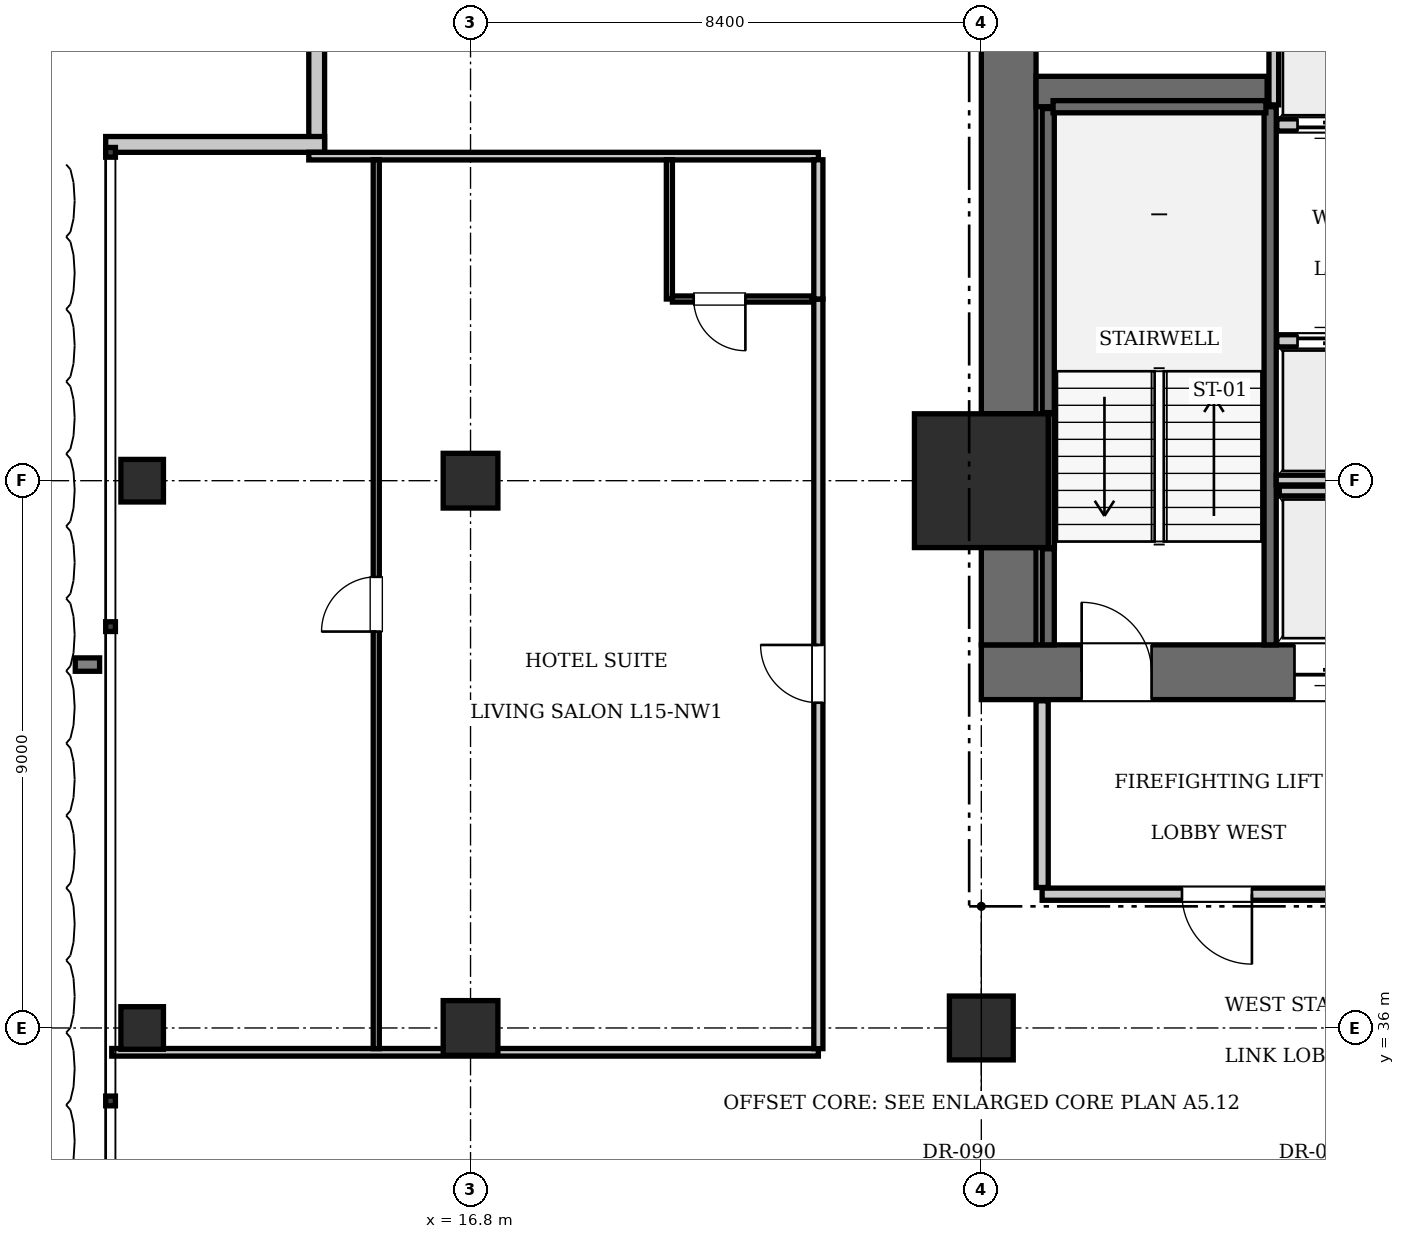
"""IFC4 building model, lengths in metres.
Left out: names, types, materials, properties, quantities, classifications, styles, units other than length and angle.
Written with IfcOpenShell. Run it as: python <this file> out.ifc"""

import sys

from ifc_helpers import new_model, si_unit, direction, frame, frame_2d, origin, origin_2d, place, context, subcontext, project, spatial, rectangle, i_section, extrude, element, fill, save


model = new_model("IFC4")
c1 = context("Model", 3, precision=1e-05, world=origin(), true_north=direction((0.0, 1.0)))
c2 = subcontext(c1, "Body", "Model", "MODEL_VIEW")
j1 = project(units=[si_unit("LENGTHUNIT", "METRE"), si_unit("PLANEANGLEUNIT", "RADIAN")], contexts=[c1])
p1 = place(None, origin())
s1 = spatial("IfcSite", under=j1, at=p1, CompositionType="ELEMENT")
p2 = place(p1, origin())
s2 = spatial("IfcBuilding", under=s1, at=p2, CompositionType="ELEMENT")
p3 = place(p2, frame((0.0, 0.0, 65.45)))
s3 = spatial("IfcBuildingStorey", under=s2, at=p3, CompositionType="ELEMENT", Elevation=65.45)
p4 = place(p3, frame((25.2, 45.0, 0.0), z_axis=(0.0, 0.0, 1.0), x_axis=(1.0, 0.0, 0.0)))
e1 = element("IfcColumn", 1, at=p4, inside=s3, PredefinedType="COLUMN", context=c2, shape_type="SweptSolid", body=[
    extrude(rectangle(XDim=2.2, YDim=2.2, at=origin_2d()), origin(), (0.0, 0.0, 1.0), 3.85),
])
p5 = place(p3, frame((25.2, 41.85, 0.0), z_axis=(0.0, 0.0, 1.0), x_axis=(1.0, 0.0, 0.0)))
e2 = element("IfcWall", 2, at=p5, inside=s3, PredefinedType="SHEAR", context=c2, shape_type="SweptSolid", body=[
    extrude(rectangle(XDim=6.8, YDim=0.9, at=frame_2d((3.4, 0.0))), origin(), (0.0, 0.0, 1.0), 3.85),
])
p6 = place(p5, frame((1.65, 0.0, 0.0)))
e3 = element("IfcOpeningElement", 3, at=p6, cuts=e2, PredefinedType="OPENING", context=c2, shape_type="SweptSolid", body=[
    extrude(rectangle(XDim=1.15, YDim=2.15, at=frame_2d((0.575, 1.075))), frame((0.0, 0.46, 0.0), z_axis=(0.0, -1.0, 0.0), x_axis=(1.0, 0.0, 0.0)), (0.0, 0.0, 1.0), 0.92),
])
p7 = place(p5, frame((5.15, 0.0, 0.0)))
e4 = element("IfcOpeningElement", 4, at=p7, cuts=e2, PredefinedType="OPENING", context=c2, shape_type="SweptSolid", body=[
    extrude(rectangle(XDim=1.1, YDim=2.2, at=frame_2d((0.55, 1.1))), frame((0.0, 0.46, 0.0), z_axis=(0.0, -1.0, 0.0), x_axis=(1.0, 0.0, 0.0)), (0.0, 0.0, 1.0), 0.92),
])
p8 = place(p3, frame((25.65, 42.3, 0.0), z_axis=(0.0, 0.0, 1.0), x_axis=(0.0, 1.0, 0.0)))
e5 = element("IfcWall", 5, at=p8, inside=s3, PredefinedType="SHEAR", context=c2, shape_type="SweptSolid", body=[
    extrude(rectangle(XDim=1.6, YDim=0.9, at=frame_2d((0.8, 0.0))), origin(), (0.0, 0.0, 1.0), 3.85),
])
p9 = place(p3, frame((25.65, 46.1, 0.0), z_axis=(0.0, 0.0, 1.0), x_axis=(0.0, 1.0, 0.0)))
e6 = element("IfcWall", 6, at=p9, inside=s3, PredefinedType="SHEAR", context=c2, shape_type="SweptSolid", body=[
    extrude(rectangle(XDim=7.0, YDim=0.9, at=frame_2d((3.5, 0.0))), origin(), (0.0, 0.0, 1.0), 3.85),
])
p10 = place(p3, frame((26.1, 51.4, 0.0), z_axis=(0.0, 0.0, 1.0), x_axis=(1.0, 0.0, 0.0)))
e7 = element("IfcWall", 7, at=p10, inside=s3, PredefinedType="SHEAR", context=c2, shape_type="SweptSolid", body=[
    extrude(rectangle(XDim=3.8, YDim=0.5, at=frame_2d((1.9, 0.0))), origin(), (0.0, 0.0, 1.0), 3.85),
])
p11 = place(p3, frame((25.2, 36.0, 0.0), z_axis=(0.0, 0.0, 1.0), x_axis=(1.0, 0.0, 0.0)))
e8 = element("IfcColumn", 8, at=p11, inside=s3, PredefinedType="COLUMN", context=c2, shape_type="SweptSolid", body=[
    extrude(rectangle(XDim=1.05, YDim=1.05, at=origin_2d()), origin(), (0.0, 0.0, 1.0), 3.85),
])
for number, where, z_axis, x_axis in (
    (9, (16.8, 36.0, 0.0), (0.0, 0.0, 1.0), (1.0, 0.0, 0.0)),
    (10, (16.8, 45.0, 0.0), (0.0, 0.0, 1.0), (1.0, 0.0, 0.0)),
):
    element("IfcColumn", number, at=place(p3, frame(where, z_axis=z_axis, x_axis=x_axis)), inside=s3, PredefinedType="COLUMN", context=c2, shape_type="SweptSolid", body=[
        extrude(rectangle(XDim=0.9, YDim=0.9, at=origin_2d()), origin(), (0.0, 0.0, 1.0), 3.85),
    ])
for number, where, z_axis, x_axis in (
    (11, (11.4, 36.0, 0.0), (0.0, 0.0, 1.0), (1.0, 0.0, 0.0)),
    (12, (11.4, 45.0, 0.0), (0.0, 0.0, 1.0), (1.0, 0.0, 0.0)),
):
    element("IfcColumn", number, at=place(p3, frame(where, z_axis=z_axis, x_axis=x_axis)), inside=s3, PredefinedType="COLUMN", context=c2, shape_type="SweptSolid", body=[
        extrude(i_section(OverallWidth=0.7, OverallDepth=0.7, WebThickness=0.028, FlangeThickness=0.044, at=origin_2d()), origin(), (0.0, 0.0, 1.0), 3.85),
    ])
p12 = place(p3, frame((29.95, 42.3, 0.0), z_axis=(0.0, 0.0, 1.0), x_axis=(0.0, 1.0, 0.0)))
e13 = element("IfcWall", 13, at=p12, inside=s3, PredefinedType="SOLIDWALL", context=c2, shape_type="SweptSolid", body=[
    extrude(rectangle(XDim=8.85, YDim=0.2, at=frame_2d((4.425, 0.0))), origin(), (0.0, 0.0, 1.0), 3.61),
])
p13 = place(p3, frame((26.3, 42.3, 0.0), z_axis=(0.0, 0.0, 1.0), x_axis=(0.0, 1.0, 0.0)))
e14 = element("IfcWall", 14, at=p13, inside=s3, PredefinedType="SOLIDWALL", context=c2, shape_type="SweptSolid", body=[
    extrude(rectangle(XDim=1.58, YDim=0.2, at=frame_2d((0.79, 0.0))), origin(), (0.0, 0.0, 1.0), 3.61),
])
p14 = place(p3, frame((26.3, 46.12, 0.0), z_axis=(0.0, 0.0, 1.0), x_axis=(0.0, 1.0, 0.0)))
e15 = element("IfcWall", 15, at=p14, inside=s3, PredefinedType="SOLIDWALL", context=c2, shape_type="SweptSolid", body=[
    extrude(rectangle(XDim=5.0, YDim=0.2, at=frame_2d((2.5, 0.0))), origin(), (0.0, 0.0, 1.0), 3.61),
])
p15 = place(p3, frame((26.38, 51.15, 0.0), z_axis=(0.0, 0.0, 1.0), x_axis=(1.0, 0.0, 0.0)))
e16 = element("IfcWall", 16, at=p15, inside=s3, PredefinedType="SOLIDWALL", context=c2, shape_type="SweptSolid", body=[
    extrude(rectangle(XDim=3.5, YDim=0.2, at=frame_2d((1.75, 0.0))), origin(), (0.0, 0.0, 1.0), 3.61),
])
p16 = place(p3, frame((26.352, 43.9, 0.0), z_axis=(0.0, 0.0, 1.0), x_axis=(0.0, 1.0, 0.0)))
e17 = element("IfcWall", 17, at=p16, inside=s3, PredefinedType="SOLIDWALL", context=c2, shape_type="SweptSolid", body=[
    extrude(rectangle(XDim=2.2, YDim=0.1, at=frame_2d((1.1, 0.0))), origin(), (0.0, 0.0, 1.0), 3.61),
])
p17 = place(p3, frame((30.06, 47.3, 0.0), z_axis=(0.0, 0.0, 1.0), x_axis=(1.0, 0.0, 0.0)))
e18 = element("IfcWall", 18, at=p17, inside=s3, PredefinedType="SOLIDWALL", context=c2, shape_type="SweptSolid", body=[
    extrude(rectangle(XDim=1.68, YDim=0.2, at=frame_2d((0.84, 0.0))), origin(), (0.0, 0.0, 1.0), 3.61),
])
p18 = place(p17, frame((0.34, 0.0, 0.0)))
e19 = element("IfcOpeningElement", 19, at=p18, cuts=e18, PredefinedType="OPENING", context=c2, shape_type="SweptSolid", body=[
    extrude(rectangle(XDim=1.0, YDim=2.15, at=frame_2d((0.5, 1.075))), frame((0.0, 0.11, 0.0), z_axis=(0.0, -1.0, 0.0), x_axis=(1.0, 0.0, 0.0)), (0.0, 0.0, 1.0), 0.22),
])
p19 = place(p3, frame((30.06, 50.85, 0.0), z_axis=(0.0, 0.0, 1.0), x_axis=(1.0, 0.0, 0.0)))
e20 = element("IfcWall", 20, at=p19, inside=s3, PredefinedType="SOLIDWALL", context=c2, shape_type="SweptSolid", body=[
    extrude(rectangle(XDim=1.68, YDim=0.2, at=frame_2d((0.84, 0.0))), origin(), (0.0, 0.0, 1.0), 3.61),
])
p20 = place(p19, frame((0.34, 0.0, 0.0)))
e21 = element("IfcOpeningElement", 21, at=p20, cuts=e20, PredefinedType="OPENING", context=c2, shape_type="SweptSolid", body=[
    extrude(rectangle(XDim=1.0, YDim=2.15, at=frame_2d((0.5, 1.075))), frame((0.0, 0.11, 0.0), z_axis=(0.0, -1.0, 0.0), x_axis=(1.0, 0.0, 0.0)), (0.0, 0.0, 1.0), 0.22),
])
p21 = place(p3, frame((30.1, 44.83, 0.0), z_axis=(0.0, 0.0, 1.0), x_axis=(1.0, 0.0, 0.0)))
e22 = element("IfcWall", 22, at=p21, inside=s3, PredefinedType="SOLIDWALL", context=c2, shape_type="SweptSolid", body=[
    extrude(rectangle(XDim=1.6, YDim=0.16, at=frame_2d((0.8, 0.0))), origin(), (0.0, 0.0, 1.0), 3.61),
])
p22 = place(p3, frame((30.05, 45.01, 0.0), z_axis=(0.0, 0.0, 1.0), x_axis=(1.0, 0.0, 0.0)))
e23 = element("IfcWall", 23, at=p22, inside=s3, PredefinedType="SOLIDWALL", context=c2, shape_type="SweptSolid", body=[
    extrude(rectangle(XDim=3.45, YDim=0.16, at=frame_2d((1.725, 0.0))), origin(), (0.0, 0.0, 1.0), 3.61),
])
p23 = place(p3, frame((30.01, 51.18, 0.0), z_axis=(0.0, 0.0, 1.0), x_axis=(0.0, 1.0, 0.0)))
e24 = element("IfcWall", 24, at=p23, inside=s3, PredefinedType="SOLIDWALL", context=c2, shape_type="SweptSolid", body=[
    extrude(rectangle(XDim=1.92, YDim=0.16, at=frame_2d((0.96, 0.0))), origin(), (0.0, 0.0, 1.0), 3.61),
])
p24 = place(p3, frame((14.27, 50.4, 0.0), z_axis=(0.0, 0.0, 1.0), x_axis=(0.0, 1.0, 0.0)))
e25 = element("IfcWall", 25, at=p24, inside=s3, PredefinedType="SOLIDWALL", context=c2, shape_type="SweptSolid", body=[
    extrude(rectangle(XDim=3.6, YDim=0.26, at=frame_2d((1.8, 0.0))), origin(), (0.0, 0.0, 1.0), 3.61),
])
p25 = place(p3, frame((10.8, 50.53, 0.0), z_axis=(0.0, 0.0, 1.0), x_axis=(1.0, 0.0, 0.0)))
e26 = element("IfcWall", 26, at=p25, inside=s3, PredefinedType="SOLIDWALL", context=c2, shape_type="SweptSolid", body=[
    extrude(rectangle(XDim=3.6, YDim=0.26, at=frame_2d((1.8, 0.0))), origin(), (0.0, 0.0, 1.0), 3.61),
])
p26 = place(p3, frame((26.2, 38.2, 0.0), z_axis=(0.0, 0.0, 1.0), x_axis=(1.0, 0.0, 0.0)))
e27 = element("IfcWall", 27, at=p26, inside=s3, PredefinedType="PARTITIONING", context=c2, shape_type="SweptSolid", body=[
    extrude(rectangle(XDim=5.8, YDim=0.2, at=frame_2d((2.9, 0.0))), origin(), (0.0, 0.0, 1.0), 3.61),
])
p27 = place(p26, frame((2.3, 0.0, 0.0)))
e28 = element("IfcOpeningElement", 28, at=p27, cuts=e27, PredefinedType="OPENING", context=c2, shape_type="SweptSolid", body=[
    extrude(rectangle(XDim=1.15, YDim=2.15, at=frame_2d((0.575, 1.075))), frame((0.0, 0.11, 0.0), z_axis=(0.0, -1.0, 0.0), x_axis=(1.0, 0.0, 0.0)), (0.0, 0.0, 1.0), 0.22),
])
p28 = place(p3, frame((26.2, 38.31, 0.0), z_axis=(0.0, 0.0, 1.0), x_axis=(0.0, 1.0, 0.0)))
e29 = element("IfcWall", 29, at=p28, inside=s3, PredefinedType="PARTITIONING", context=c2, shape_type="SweptSolid", body=[
    extrude(rectangle(XDim=3.07, YDim=0.2, at=frame_2d((1.535, 0.0))), origin(), (0.0, 0.0, 1.0), 3.61),
])
p29 = place(p3, frame((10.9, 35.6, 0.0), z_axis=(0.0, 0.0, 1.0), x_axis=(1.0, 0.0, 0.0)))
e30 = element("IfcWall", 30, at=p29, inside=s3, PredefinedType="PARTITIONING", context=c2, shape_type="SweptSolid", body=[
    extrude(rectangle(XDim=11.62, YDim=0.125, at=frame_2d((5.81, 0.0))), origin(), (0.0, 0.0, 1.0), 3.61),
])
p30 = place(p3, frame((14.14, 50.337, 0.0), z_axis=(0.0, 0.0, 1.0), x_axis=(1.0, 0.0, 0.0)))
e31 = element("IfcWall", 31, at=p30, inside=s3, PredefinedType="PARTITIONING", context=c2, shape_type="SweptSolid", body=[
    extrude(rectangle(XDim=8.38, YDim=0.125, at=frame_2d((4.19, 0.0))), origin(), (0.0, 0.0, 1.0), 3.61),
])
p31 = place(p3, frame((22.52, 35.66, 0.0), z_axis=(0.0, 0.0, 1.0), x_axis=(0.0, 1.0, 0.0)))
e32 = element("IfcWall", 32, at=p31, inside=s3, PredefinedType="PARTITIONING", context=c2, shape_type="SweptSolid", body=[
    extrude(rectangle(XDim=12.328, YDim=0.15, at=frame_2d((6.164, 0.0))), origin(), (0.0, 0.0, 1.0), 3.61),
])
p32 = place(p31, frame((5.689, 0.0, 0.0)))
e33 = element("IfcOpeningElement", 33, at=p32, cuts=e32, PredefinedType="OPENING", context=c2, shape_type="SweptSolid", body=[
    extrude(rectangle(XDim=0.95, YDim=2.15, at=frame_2d((0.475, 1.075))), frame((0.0, 0.085, 0.0), z_axis=(0.0, -1.0, 0.0), x_axis=(1.0, 0.0, 0.0)), (0.0, 0.0, 1.0), 0.17),
])
p33 = place(p3, frame((22.52, 47.988, 0.0), z_axis=(0.0, 0.0, 1.0), x_axis=(0.0, 1.0, 0.0)))
e34 = element("IfcWall", 34, at=p33, inside=s3, PredefinedType="PARTITIONING", context=c2, shape_type="SweptSolid", body=[
    extrude(rectangle(XDim=2.29, YDim=0.15, at=frame_2d((1.145, 0.0))), origin(), (0.0, 0.0, 1.0), 3.61),
])
p34 = place(p3, frame((20.07, 47.988, 0.0), z_axis=(0.0, 0.0, 1.0), x_axis=(0.0, 1.0, 0.0)))
e35 = element("IfcWall", 35, at=p34, inside=s3, PredefinedType="PARTITIONING", context=c2, shape_type="SweptSolid", body=[
    extrude(rectangle(XDim=2.29, YDim=0.1, at=frame_2d((1.145, 0.0))), origin(), (0.0, 0.0, 1.0), 3.61),
])
p35 = place(p3, frame((20.12, 47.988, 0.0), z_axis=(0.0, 0.0, 1.0), x_axis=(1.0, 0.0, 0.0)))
e36 = element("IfcWall", 36, at=p35, inside=s3, PredefinedType="PARTITIONING", context=c2, shape_type="SweptSolid", body=[
    extrude(rectangle(XDim=2.3, YDim=0.1, at=frame_2d((1.15, 0.0))), origin(), (0.0, 0.0, 1.0), 3.61),
])
p36 = place(p35, frame((0.35, 0.0, 0.0)))
e37 = element("IfcOpeningElement", 37, at=p36, cuts=e36, PredefinedType="OPENING", context=c2, shape_type="SweptSolid", body=[
    extrude(rectangle(XDim=0.85, YDim=2.1, at=frame_2d((0.425, 1.05))), frame((0.0, 0.06, 0.0), z_axis=(0.0, -1.0, 0.0), x_axis=(1.0, 0.0, 0.0)), (0.0, 0.0, 1.0), 0.12),
])
p37 = place(p3, frame((15.25, 35.66, 0.0), z_axis=(0.0, 0.0, 1.0), x_axis=(0.0, 1.0, 0.0)))
e38 = element("IfcWall", 38, at=p37, inside=s3, PredefinedType="PARTITIONING", context=c2, shape_type="SweptSolid", body=[
    extrude(rectangle(XDim=14.618, YDim=0.1, at=frame_2d((7.309, 0.0))), origin(), (0.0, 0.0, 1.0), 3.61),
])
p38 = place(p37, frame((6.859, 0.0, 0.0)))
e39 = element("IfcOpeningElement", 39, at=p38, cuts=e38, PredefinedType="OPENING", context=c2, shape_type="SweptSolid", body=[
    extrude(rectangle(XDim=0.9, YDim=2.1, at=frame_2d((0.45, 1.05))), frame((0.0, 0.06, 0.0), z_axis=(0.0, -1.0, 0.0), x_axis=(1.0, 0.0, 0.0)), (0.0, 0.0, 1.0), 0.12),
])
p39 = place(p6, origin())
e40 = element("IfcDoor", 40, at=p39, inside=s3, OperationType="SINGLE_SWING_LEFT", PredefinedType="DOOR", context=c2, shape_type="SweptSolid", body=[
    extrude(rectangle(XDim=1.15, YDim=2.15, at=frame_2d((0.575, 1.075))), frame((0.0, 0.025, 0.0), z_axis=(0.0, -1.0, 0.0), x_axis=(1.0, 0.0, 0.0)), (0.0, 0.0, 1.0), 0.05),
])
fill(e3, e40)
p40 = place(p18, origin())
e41 = element("IfcDoor", 41, at=p40, inside=s3, OperationType="SLIDING_TO_LEFT", PredefinedType="DOOR", context=c2, shape_type="SweptSolid", body=[
    extrude(rectangle(XDim=1.0, YDim=2.15, at=frame_2d((0.5, 1.075))), frame((0.0, 0.025, 0.0), z_axis=(0.0, -1.0, 0.0), x_axis=(1.0, 0.0, 0.0)), (0.0, 0.0, 1.0), 0.05),
])
fill(e19, e41)
p41 = place(p20, frame((1.0, 0.0, 0.0), z_axis=(0.0, 0.0, 1.0), x_axis=(-1.0, 0.0, 0.0)))
e42 = element("IfcDoor", 42, at=p41, inside=s3, OperationType="SLIDING_TO_LEFT", PredefinedType="DOOR", context=c2, shape_type="SweptSolid", body=[
    extrude(rectangle(XDim=1.0, YDim=2.15, at=frame_2d((0.5, 1.075))), frame((0.0, 0.025, 0.0), z_axis=(0.0, -1.0, 0.0), x_axis=(1.0, 0.0, 0.0)), (0.0, 0.0, 1.0), 0.05),
])
fill(e21, e42)
p42 = place(p7, frame((1.1, 0.0, 0.0), z_axis=(0.0, 0.0, 1.0), x_axis=(-1.0, 0.0, 0.0)))
e43 = element("IfcDoor", 43, at=p42, inside=s3, OperationType="SLIDING_TO_LEFT", PredefinedType="DOOR", context=c2, shape_type="SweptSolid", body=[
    extrude(rectangle(XDim=1.1, YDim=2.2, at=frame_2d((0.55, 1.1))), frame((0.0, 0.025, 0.0), z_axis=(0.0, -1.0, 0.0), x_axis=(1.0, 0.0, 0.0)), (0.0, 0.0, 1.0), 0.05),
])
fill(e4, e43)
p43 = place(p27, frame((1.15, 0.0, 0.0), z_axis=(0.0, 0.0, 1.0), x_axis=(-1.0, 0.0, 0.0)))
e44 = element("IfcDoor", 44, at=p43, inside=s3, OperationType="SINGLE_SWING_LEFT", PredefinedType="DOOR", context=c2, shape_type="SweptSolid", body=[
    extrude(rectangle(XDim=1.15, YDim=2.15, at=frame_2d((0.575, 1.075))), frame((0.0, 0.025, 0.0), z_axis=(0.0, -1.0, 0.0), x_axis=(1.0, 0.0, 0.0)), (0.0, 0.0, 1.0), 0.05),
])
fill(e28, e44)
p44 = place(p36, frame((0.85, 0.0, 0.0), z_axis=(0.0, 0.0, 1.0), x_axis=(-1.0, 0.0, 0.0)))
e45 = element("IfcDoor", 45, at=p44, inside=s3, OperationType="SINGLE_SWING_LEFT", PredefinedType="DOOR", context=c2, shape_type="SweptSolid", body=[
    extrude(rectangle(XDim=0.85, YDim=2.1, at=frame_2d((0.425, 1.05))), frame((0.0, 0.025, 0.0), z_axis=(0.0, -1.0, 0.0), x_axis=(1.0, 0.0, 0.0)), (0.0, 0.0, 1.0), 0.05),
])
fill(e37, e45)
p45 = place(p32, origin())
e46 = element("IfcDoor", 46, at=p45, inside=s3, OperationType="SINGLE_SWING_RIGHT", PredefinedType="DOOR", context=c2, shape_type="SweptSolid", body=[
    extrude(rectangle(XDim=0.95, YDim=2.15, at=frame_2d((0.475, 1.075))), frame((0.0, 0.025, 0.0), z_axis=(0.0, -1.0, 0.0), x_axis=(1.0, 0.0, 0.0)), (0.0, 0.0, 1.0), 0.05),
])
fill(e33, e46)
p46 = place(p38, origin())
e47 = element("IfcDoor", 47, at=p46, inside=s3, OperationType="SINGLE_SWING_LEFT", PredefinedType="DOOR", context=c2, shape_type="SweptSolid", body=[
    extrude(rectangle(XDim=0.9, YDim=2.1, at=frame_2d((0.45, 1.05))), frame((0.0, 0.025, 0.0), z_axis=(0.0, -1.0, 0.0), x_axis=(1.0, 0.0, 0.0)), (0.0, 0.0, 1.0), 0.05),
])
fill(e39, e47)
save(model, sys.argv[1])
